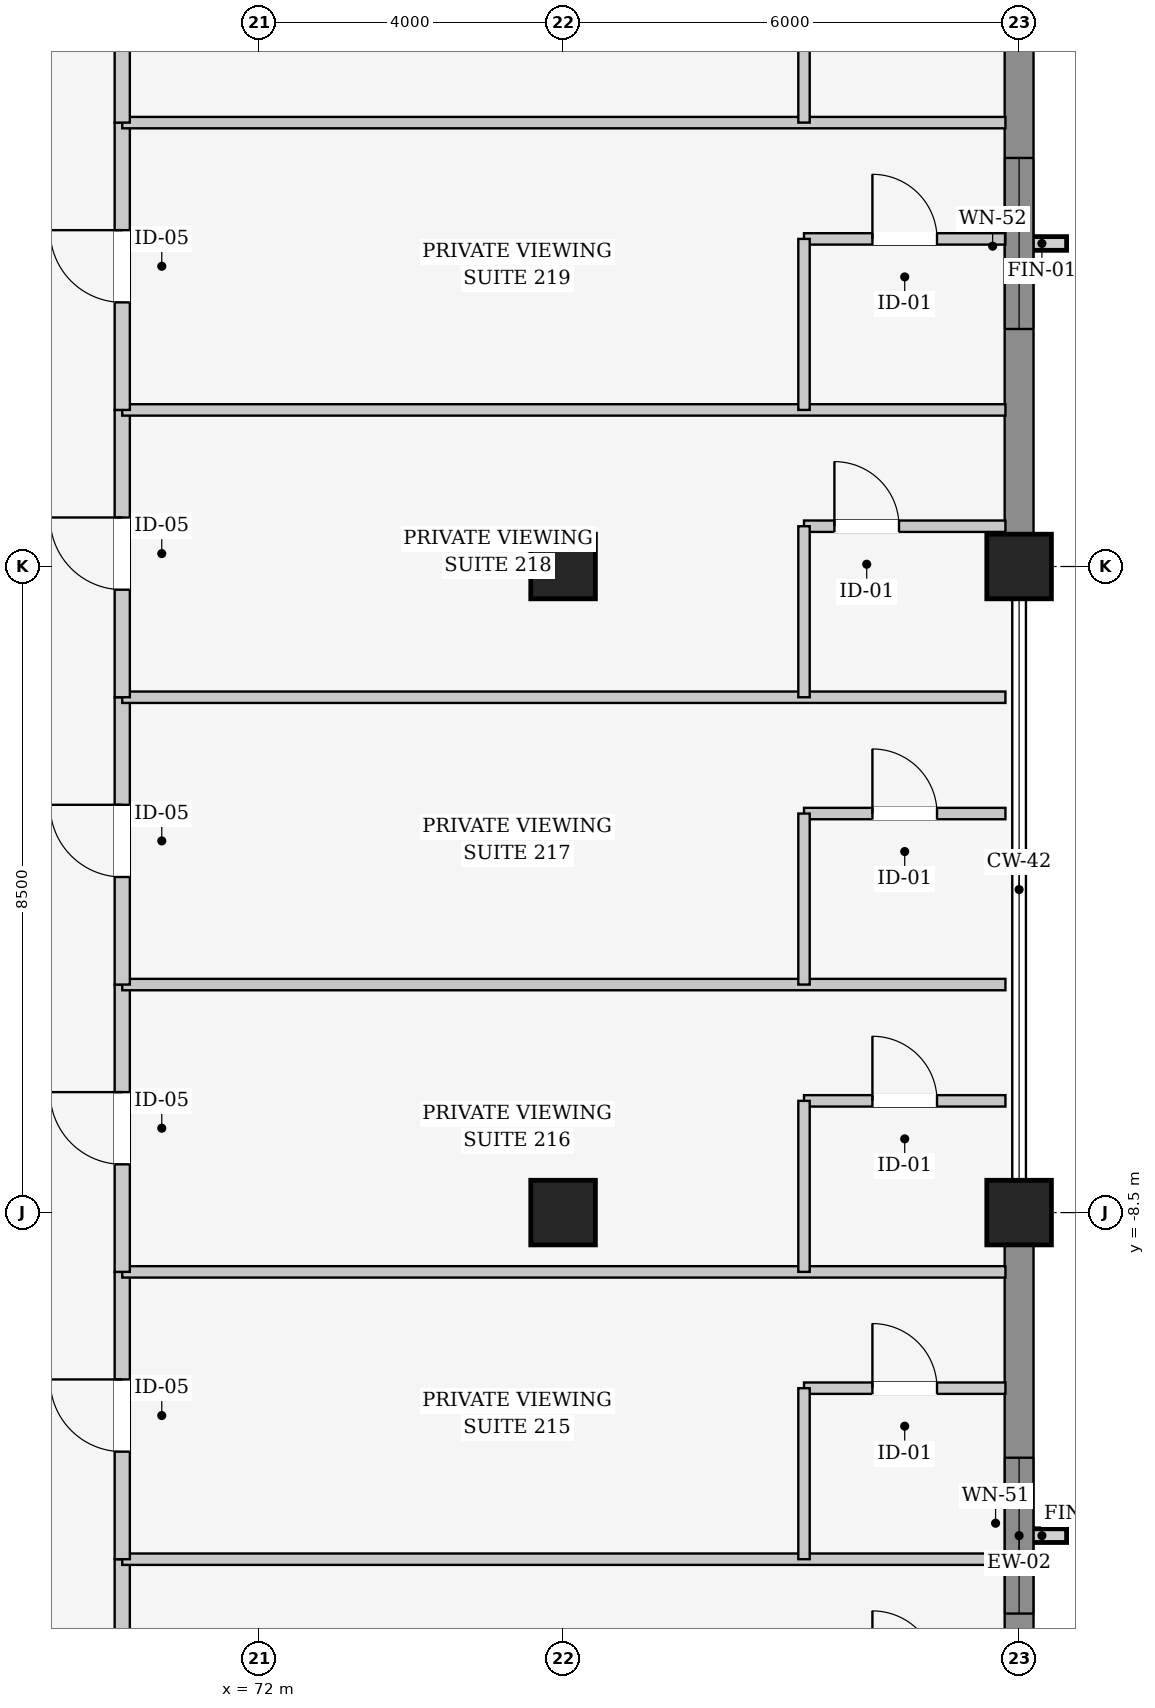
"""IFC4 building model, lengths in metres.
Left out: names, types, materials, properties, quantities, classifications, styles, units other than length and angle.
Written with IfcOpenShell. Run it as: python <this file> out.ifc"""

import sys

from ifc_helpers import new_model, si_unit, direction, frame, frame_2d, origin, origin_2d, place, context, subcontext, project, spatial, rectangle, extrude, element, fill, save


model = new_model("IFC4")
c1 = context("Model", 3, precision=1e-05, world=origin(), true_north=direction((0.0, 1.0)))
c2 = subcontext(c1, "Body", "Model", "MODEL_VIEW")
j1 = project(units=[si_unit("LENGTHUNIT", "METRE"), si_unit("PLANEANGLEUNIT", "RADIAN")], contexts=[c1])
p1 = place(None, origin())
s1 = spatial("IfcSite", under=j1, at=p1, CompositionType="ELEMENT")
p2 = place(p1, origin())
s2 = spatial("IfcBuilding", under=s1, at=p2, CompositionType="ELEMENT")
p3 = place(p2, frame((0.0, 0.0, 11.4)))
s3 = spatial("IfcBuildingStorey", under=s2, at=p3, CompositionType="ELEMENT", Elevation=11.4)
for number, where, z_axis, x_axis in (
    (1, (76.0, -8.5, 0.0), (0.0, 0.0, 1.0), (1.0, 0.0, 0.0)),
    (2, (76.0, 0.0, 0.0), (0.0, 0.0, 1.0), (1.0, 0.0, 0.0)),
    (3, (82.0, -8.5, 0.0), (0.0, 0.0, 1.0), (1.0, 0.0, 0.0)),
    (4, (82.0, 0.0, 0.0), (0.0, 0.0, 1.0), (1.0, 0.0, 0.0)),
):
    element("IfcColumn", number, at=place(p3, frame(where, z_axis=z_axis, x_axis=x_axis)), inside=s3, PredefinedType="COLUMN", context=c2, shape_type="SweptSolid", body=[
        extrude(rectangle(XDim=0.85, YDim=0.85, at=origin_2d()), origin(), (0.0, 0.0, 1.0), 4.8),
    ])
p4 = place(p3, frame((82.0, -8.907, 0.0), z_axis=(0.0, 0.0, 1.0), x_axis=(0.0, -1.0, 0.0)))
e5 = element("IfcWall", 5, at=p4, inside=s3, PredefinedType="SOLIDWALL", context=c2, shape_type="SweptSolid", body=[
    extrude(rectangle(XDim=7.686, YDim=0.38, at=frame_2d((3.843, 0.0))), origin(), (0.0, 0.0, 1.0), 3.76),
])
p5 = place(p4, frame((2.818, 0.0, 0.9)))
e6 = element("IfcOpeningElement", 6, at=p5, cuts=e5, PredefinedType="OPENING", context=c2, shape_type="SweptSolid", body=[
    extrude(rectangle(XDim=2.05, YDim=2.5, at=frame_2d((1.025, 1.25))), frame((0.0, 0.2, 0.0), z_axis=(0.0, -1.0, 0.0), x_axis=(1.0, 0.0, 0.0)), (0.0, 0.0, 1.0), 0.4),
])
p6 = place(p3, frame((82.0, 8.093, 0.0), z_axis=(0.0, 0.0, 1.0), x_axis=(0.0, -1.0, 0.0)))
e7 = element("IfcWall", 7, at=p6, inside=s3, PredefinedType="SOLIDWALL", context=c2, shape_type="SweptSolid", body=[
    extrude(rectangle(XDim=7.686, YDim=0.38, at=frame_2d((3.843, 0.0))), origin(), (0.0, 0.0, 1.0), 3.76),
])
p7 = place(p6, frame((2.718, 0.0, 0.9)))
e8 = element("IfcOpeningElement", 8, at=p7, cuts=e7, PredefinedType="OPENING", context=c2, shape_type="SweptSolid", body=[
    extrude(rectangle(XDim=2.25, YDim=2.5, at=frame_2d((1.125, 1.25))), frame((0.0, 0.2, 0.0), z_axis=(0.0, -1.0, 0.0), x_axis=(1.0, 0.0, 0.0)), (0.0, 0.0, 1.0), 0.4),
])
p8 = place(p3, frame((70.2, -16.84, 0.0), z_axis=(0.0, 0.0, 1.0), x_axis=(0.0, 1.0, 0.0)))
e9 = element("IfcWall", 9, at=p8, inside=s3, PredefinedType="PARTITIONING", context=c2, shape_type="SweptSolid", body=[
    extrude(rectangle(XDim=3.78, YDim=0.2, at=frame_2d((1.89, 0.0))), origin(), (0.0, 0.0, 1.0), 3.545),
])
p9 = place(p8, frame((1.415, 0.0, 0.0)))
e10 = element("IfcOpeningElement", 10, at=p9, cuts=e9, PredefinedType="OPENING", context=c2, shape_type="SweptSolid", body=[
    extrude(rectangle(XDim=0.95, YDim=2.25, at=frame_2d((0.475, 1.125))), frame((0.0, 0.11, 0.0), z_axis=(0.0, -1.0, 0.0), x_axis=(1.0, 0.0, 0.0)), (0.0, 0.0, 1.0), 0.22),
])
p10 = place(p3, frame((70.2, -13.06, 0.0), z_axis=(0.0, 0.0, 1.0), x_axis=(1.0, 0.0, 0.0)))
e11 = element("IfcWall", 11, at=p10, inside=s3, PredefinedType="PARTITIONING", context=c2, shape_type="SweptSolid", body=[
    extrude(rectangle(XDim=11.62, YDim=0.15, at=frame_2d((5.81, 0.0))), origin(), (0.0, 0.0, 1.0), 3.845),
])
p11 = place(p3, frame((79.17, -10.81, 0.0), z_axis=(0.0, 0.0, 1.0), x_axis=(1.0, 0.0, 0.0)))
e12 = element("IfcWall", 12, at=p11, inside=s3, PredefinedType="PARTITIONING", context=c2, shape_type="SweptSolid", body=[
    extrude(rectangle(XDim=2.65, YDim=0.15, at=frame_2d((1.325, 0.0))), origin(), (0.0, 0.0, 1.0), 3.845),
])
p12 = place(p11, frame((0.9, 0.0, 0.0)))
e13 = element("IfcOpeningElement", 13, at=p12, cuts=e12, PredefinedType="OPENING", context=c2, shape_type="SweptSolid", body=[
    extrude(rectangle(XDim=0.85, YDim=2.15, at=frame_2d((0.425, 1.075))), frame((0.0, 0.085, 0.0), z_axis=(0.0, -1.0, 0.0), x_axis=(1.0, 0.0, 0.0)), (0.0, 0.0, 1.0), 0.17),
])
p13 = place(p3, frame((79.17, -13.06, 0.0), z_axis=(0.0, 0.0, 1.0), x_axis=(0.0, 1.0, 0.0)))
e14 = element("IfcWall", 14, at=p13, inside=s3, PredefinedType="PARTITIONING", context=c2, shape_type="SweptSolid", body=[
    extrude(rectangle(XDim=2.25, YDim=0.15, at=frame_2d((1.125, 0.0))), origin(), (0.0, 0.0, 1.0), 4.14),
])
p14 = place(p3, frame((70.2, -13.06, 0.0), z_axis=(0.0, 0.0, 1.0), x_axis=(0.0, 1.0, 0.0)))
e15 = element("IfcWall", 15, at=p14, inside=s3, PredefinedType="PARTITIONING", context=c2, shape_type="SweptSolid", body=[
    extrude(rectangle(XDim=3.78, YDim=0.2, at=frame_2d((1.89, 0.0))), origin(), (0.0, 0.0, 1.0), 4.14),
])
p15 = place(p14, frame((1.415, 0.0, 0.0)))
e16 = element("IfcOpeningElement", 16, at=p15, cuts=e15, PredefinedType="OPENING", context=c2, shape_type="SweptSolid", body=[
    extrude(rectangle(XDim=0.95, YDim=2.25, at=frame_2d((0.475, 1.125))), frame((0.0, 0.11, 0.0), z_axis=(0.0, -1.0, 0.0), x_axis=(1.0, 0.0, 0.0)), (0.0, 0.0, 1.0), 0.22),
])
p16 = place(p3, frame((70.2, -9.28, 0.0), z_axis=(0.0, 0.0, 1.0), x_axis=(1.0, 0.0, 0.0)))
e17 = element("IfcWall", 17, at=p16, inside=s3, PredefinedType="PARTITIONING", context=c2, shape_type="SweptSolid", body=[
    extrude(rectangle(XDim=11.62, YDim=0.15, at=frame_2d((5.81, 0.0))), origin(), (0.0, 0.0, 1.0), 3.845),
])
p17 = place(p3, frame((79.17, -7.03, 0.0), z_axis=(0.0, 0.0, 1.0), x_axis=(1.0, 0.0, 0.0)))
e18 = element("IfcWall", 18, at=p17, inside=s3, PredefinedType="PARTITIONING", context=c2, shape_type="SweptSolid", body=[
    extrude(rectangle(XDim=2.65, YDim=0.15, at=frame_2d((1.325, 0.0))), origin(), (0.0, 0.0, 1.0), 3.845),
])
p18 = place(p17, frame((0.9, 0.0, 0.0)))
e19 = element("IfcOpeningElement", 19, at=p18, cuts=e18, PredefinedType="OPENING", context=c2, shape_type="SweptSolid", body=[
    extrude(rectangle(XDim=0.85, YDim=2.15, at=frame_2d((0.425, 1.075))), frame((0.0, 0.085, 0.0), z_axis=(0.0, -1.0, 0.0), x_axis=(1.0, 0.0, 0.0)), (0.0, 0.0, 1.0), 0.17),
])
p19 = place(p3, frame((79.17, -9.28, 0.0), z_axis=(0.0, 0.0, 1.0), x_axis=(0.0, 1.0, 0.0)))
e20 = element("IfcWall", 20, at=p19, inside=s3, PredefinedType="PARTITIONING", context=c2, shape_type="SweptSolid", body=[
    extrude(rectangle(XDim=2.25, YDim=0.15, at=frame_2d((1.125, 0.0))), origin(), (0.0, 0.0, 1.0), 3.745),
])
p20 = place(p3, frame((70.2, -9.28, 0.0), z_axis=(0.0, 0.0, 1.0), x_axis=(0.0, 1.0, 0.0)))
e21 = element("IfcWall", 21, at=p20, inside=s3, PredefinedType="PARTITIONING", context=c2, shape_type="SweptSolid", body=[
    extrude(rectangle(XDim=3.78, YDim=0.2, at=frame_2d((1.89, 0.0))), origin(), (0.0, 0.0, 1.0), 3.545),
])
p21 = place(p20, frame((1.415, 0.0, 0.0)))
e22 = element("IfcOpeningElement", 22, at=p21, cuts=e21, PredefinedType="OPENING", context=c2, shape_type="SweptSolid", body=[
    extrude(rectangle(XDim=0.95, YDim=2.25, at=frame_2d((0.475, 1.125))), frame((0.0, 0.11, 0.0), z_axis=(0.0, -1.0, 0.0), x_axis=(1.0, 0.0, 0.0)), (0.0, 0.0, 1.0), 0.22),
])
p22 = place(p3, frame((70.2, -5.5, 0.0), z_axis=(0.0, 0.0, 1.0), x_axis=(1.0, 0.0, 0.0)))
e23 = element("IfcWall", 23, at=p22, inside=s3, PredefinedType="PARTITIONING", context=c2, shape_type="SweptSolid", body=[
    extrude(rectangle(XDim=11.62, YDim=0.15, at=frame_2d((5.81, 0.0))), origin(), (0.0, 0.0, 1.0), 3.845),
])
p23 = place(p3, frame((79.17, -3.25, 0.0), z_axis=(0.0, 0.0, 1.0), x_axis=(1.0, 0.0, 0.0)))
e24 = element("IfcWall", 24, at=p23, inside=s3, PredefinedType="PARTITIONING", context=c2, shape_type="SweptSolid", body=[
    extrude(rectangle(XDim=2.65, YDim=0.15, at=frame_2d((1.325, 0.0))), origin(), (0.0, 0.0, 1.0), 3.845),
])
p24 = place(p23, frame((0.9, 0.0, 0.0)))
e25 = element("IfcOpeningElement", 25, at=p24, cuts=e24, PredefinedType="OPENING", context=c2, shape_type="SweptSolid", body=[
    extrude(rectangle(XDim=0.85, YDim=2.15, at=frame_2d((0.425, 1.075))), frame((0.0, 0.085, 0.0), z_axis=(0.0, -1.0, 0.0), x_axis=(1.0, 0.0, 0.0)), (0.0, 0.0, 1.0), 0.17),
])
p25 = place(p3, frame((79.17, -5.5, 0.0), z_axis=(0.0, 0.0, 1.0), x_axis=(0.0, 1.0, 0.0)))
e26 = element("IfcWall", 26, at=p25, inside=s3, PredefinedType="PARTITIONING", context=c2, shape_type="SweptSolid", body=[
    extrude(rectangle(XDim=2.25, YDim=0.15, at=frame_2d((1.125, 0.0))), origin(), (0.0, 0.0, 1.0), 4.14),
])
p26 = place(p3, frame((70.2, -5.5, 0.0), z_axis=(0.0, 0.0, 1.0), x_axis=(0.0, 1.0, 0.0)))
e27 = element("IfcWall", 27, at=p26, inside=s3, PredefinedType="PARTITIONING", context=c2, shape_type="SweptSolid", body=[
    extrude(rectangle(XDim=3.78, YDim=0.2, at=frame_2d((1.89, 0.0))), origin(), (0.0, 0.0, 1.0), 4.14),
])
p27 = place(p26, frame((1.415, 0.0, 0.0)))
e28 = element("IfcOpeningElement", 28, at=p27, cuts=e27, PredefinedType="OPENING", context=c2, shape_type="SweptSolid", body=[
    extrude(rectangle(XDim=0.95, YDim=2.25, at=frame_2d((0.475, 1.125))), frame((0.0, 0.11, 0.0), z_axis=(0.0, -1.0, 0.0), x_axis=(1.0, 0.0, 0.0)), (0.0, 0.0, 1.0), 0.22),
])
p28 = place(p3, frame((70.2, -1.72, 0.0), z_axis=(0.0, 0.0, 1.0), x_axis=(1.0, 0.0, 0.0)))
e29 = element("IfcWall", 29, at=p28, inside=s3, PredefinedType="PARTITIONING", context=c2, shape_type="SweptSolid", body=[
    extrude(rectangle(XDim=11.62, YDim=0.15, at=frame_2d((5.81, 0.0))), origin(), (0.0, 0.0, 1.0), 3.845),
])
p29 = place(p3, frame((79.17, 0.53, 0.0), z_axis=(0.0, 0.0, 1.0), x_axis=(1.0, 0.0, 0.0)))
e30 = element("IfcWall", 30, at=p29, inside=s3, PredefinedType="PARTITIONING", context=c2, shape_type="SweptSolid", body=[
    extrude(rectangle(XDim=2.65, YDim=0.15, at=frame_2d((1.325, 0.0))), origin(), (0.0, 0.0, 1.0), 3.845),
])
p30 = place(p29, frame((0.4, 0.0, 0.0)))
e31 = element("IfcOpeningElement", 31, at=p30, cuts=e30, PredefinedType="OPENING", context=c2, shape_type="SweptSolid", body=[
    extrude(rectangle(XDim=0.85, YDim=2.15, at=frame_2d((0.425, 1.075))), frame((0.0, 0.085, 0.0), z_axis=(0.0, -1.0, 0.0), x_axis=(1.0, 0.0, 0.0)), (0.0, 0.0, 1.0), 0.17),
])
p31 = place(p3, frame((79.17, -1.72, 0.0), z_axis=(0.0, 0.0, 1.0), x_axis=(0.0, 1.0, 0.0)))
e32 = element("IfcWall", 32, at=p31, inside=s3, PredefinedType="PARTITIONING", context=c2, shape_type="SweptSolid", body=[
    extrude(rectangle(XDim=2.25, YDim=0.15, at=frame_2d((1.125, 0.0))), origin(), (0.0, 0.0, 1.0), 3.745),
])
p32 = place(p3, frame((70.2, -1.72, 0.0), z_axis=(0.0, 0.0, 1.0), x_axis=(0.0, 1.0, 0.0)))
e33 = element("IfcWall", 33, at=p32, inside=s3, PredefinedType="PARTITIONING", context=c2, shape_type="SweptSolid", body=[
    extrude(rectangle(XDim=3.78, YDim=0.2, at=frame_2d((1.89, 0.0))), origin(), (0.0, 0.0, 1.0), 3.545),
])
p33 = place(p32, frame((1.415, 0.0, 0.0)))
e34 = element("IfcOpeningElement", 34, at=p33, cuts=e33, PredefinedType="OPENING", context=c2, shape_type="SweptSolid", body=[
    extrude(rectangle(XDim=0.95, YDim=2.25, at=frame_2d((0.475, 1.125))), frame((0.0, 0.11, 0.0), z_axis=(0.0, -1.0, 0.0), x_axis=(1.0, 0.0, 0.0)), (0.0, 0.0, 1.0), 0.22),
])
p34 = place(p3, frame((70.2, 2.06, 0.0), z_axis=(0.0, 0.0, 1.0), x_axis=(1.0, 0.0, 0.0)))
e35 = element("IfcWall", 35, at=p34, inside=s3, PredefinedType="PARTITIONING", context=c2, shape_type="SweptSolid", body=[
    extrude(rectangle(XDim=11.62, YDim=0.15, at=frame_2d((5.81, 0.0))), origin(), (0.0, 0.0, 1.0), 3.845),
])
p35 = place(p3, frame((79.17, 4.31, 0.0), z_axis=(0.0, 0.0, 1.0), x_axis=(1.0, 0.0, 0.0)))
e36 = element("IfcWall", 36, at=p35, inside=s3, PredefinedType="PARTITIONING", context=c2, shape_type="SweptSolid", body=[
    extrude(rectangle(XDim=2.65, YDim=0.15, at=frame_2d((1.325, 0.0))), origin(), (0.0, 0.0, 1.0), 3.845),
])
p36 = place(p35, frame((0.9, 0.0, 0.0)))
e37 = element("IfcOpeningElement", 37, at=p36, cuts=e36, PredefinedType="OPENING", context=c2, shape_type="SweptSolid", body=[
    extrude(rectangle(XDim=0.85, YDim=2.15, at=frame_2d((0.425, 1.075))), frame((0.0, 0.085, 0.0), z_axis=(0.0, -1.0, 0.0), x_axis=(1.0, 0.0, 0.0)), (0.0, 0.0, 1.0), 0.17),
])
p37 = place(p3, frame((79.17, 2.06, 0.0), z_axis=(0.0, 0.0, 1.0), x_axis=(0.0, 1.0, 0.0)))
e38 = element("IfcWall", 38, at=p37, inside=s3, PredefinedType="PARTITIONING", context=c2, shape_type="SweptSolid", body=[
    extrude(rectangle(XDim=2.25, YDim=0.15, at=frame_2d((1.125, 0.0))), origin(), (0.0, 0.0, 1.0), 4.14),
])
p38 = place(p3, frame((70.2, 2.06, 0.0), z_axis=(0.0, 0.0, 1.0), x_axis=(0.0, 1.0, 0.0)))
e39 = element("IfcWall", 39, at=p38, inside=s3, PredefinedType="PARTITIONING", context=c2, shape_type="SweptSolid", body=[
    extrude(rectangle(XDim=3.78, YDim=0.2, at=frame_2d((1.89, 0.0))), origin(), (0.0, 0.0, 1.0), 4.14),
])
p39 = place(p38, frame((1.415, 0.0, 0.0)))
e40 = element("IfcOpeningElement", 40, at=p39, cuts=e39, PredefinedType="OPENING", context=c2, shape_type="SweptSolid", body=[
    extrude(rectangle(XDim=0.95, YDim=2.25, at=frame_2d((0.475, 1.125))), frame((0.0, 0.11, 0.0), z_axis=(0.0, -1.0, 0.0), x_axis=(1.0, 0.0, 0.0)), (0.0, 0.0, 1.0), 0.22),
])
p40 = place(p3, frame((70.2, 5.84, 0.0), z_axis=(0.0, 0.0, 1.0), x_axis=(1.0, 0.0, 0.0)))
e41 = element("IfcWall", 41, at=p40, inside=s3, PredefinedType="PARTITIONING", context=c2, shape_type="SweptSolid", body=[
    extrude(rectangle(XDim=11.62, YDim=0.15, at=frame_2d((5.81, 0.0))), origin(), (0.0, 0.0, 1.0), 3.845),
])
p41 = place(p3, frame((79.17, 5.84, 0.0), z_axis=(0.0, 0.0, 1.0), x_axis=(0.0, 1.0, 0.0)))
e42 = element("IfcWall", 42, at=p41, inside=s3, PredefinedType="PARTITIONING", context=c2, shape_type="SweptSolid", body=[
    extrude(rectangle(XDim=2.25, YDim=0.15, at=frame_2d((1.125, 0.0))), origin(), (0.0, 0.0, 1.0), 3.745),
])
p42 = place(p3, frame((70.2, 5.84, 0.0), z_axis=(0.0, 0.0, 1.0), x_axis=(0.0, 1.0, 0.0)))
e43 = element("IfcWall", 43, at=p42, inside=s3, PredefinedType="PARTITIONING", context=c2, shape_type="SweptSolid", body=[
    extrude(rectangle(XDim=3.78, YDim=0.2, at=frame_2d((1.89, 0.0))), origin(), (0.0, 0.0, 1.0), 3.545),
])
p43 = place(p42, frame((1.415, 0.0, 0.0)))
e44 = element("IfcOpeningElement", 44, at=p43, cuts=e43, PredefinedType="OPENING", context=c2, shape_type="SweptSolid", body=[
    extrude(rectangle(XDim=0.95, YDim=2.25, at=frame_2d((0.475, 1.125))), frame((0.0, 0.11, 0.0), z_axis=(0.0, -1.0, 0.0), x_axis=(1.0, 0.0, 0.0)), (0.0, 0.0, 1.0), 0.22),
])
p44 = place(p5, origin())
e45 = element("IfcWindow", 45, at=p44, inside=s3, PartitioningType="SINGLE_PANEL", PredefinedType="WINDOW", context=c2, shape_type="SweptSolid", body=[
    extrude(rectangle(XDim=2.05, YDim=2.5, at=frame_2d((1.025, 1.25))), frame((0.0, 0.03, 0.0), z_axis=(0.0, -1.0, 0.0), x_axis=(1.0, 0.0, 0.0)), (0.0, 0.0, 1.0), 0.06),
])
fill(e6, e45)
p45 = place(p7, origin())
e46 = element("IfcWindow", 46, at=p45, inside=s3, PartitioningType="SINGLE_PANEL", PredefinedType="WINDOW", context=c2, shape_type="SweptSolid", body=[
    extrude(rectangle(XDim=2.25, YDim=2.5, at=frame_2d((1.125, 1.25))), frame((0.0, 0.03, 0.0), z_axis=(0.0, -1.0, 0.0), x_axis=(1.0, 0.0, 0.0)), (0.0, 0.0, 1.0), 0.06),
])
fill(e8, e46)
p46 = place(p12, origin())
e47 = element("IfcDoor", 47, at=p46, inside=s3, OperationType="SINGLE_SWING_LEFT", PredefinedType="DOOR", context=c2, shape_type="SweptSolid", body=[
    extrude(rectangle(XDim=0.85, YDim=2.15, at=frame_2d((0.425, 1.075))), frame((0.0, 0.025, 0.0), z_axis=(0.0, -1.0, 0.0), x_axis=(1.0, 0.0, 0.0)), (0.0, 0.0, 1.0), 0.05),
])
fill(e13, e47)
p47 = place(p15, origin())
e48 = element("IfcDoor", 48, at=p47, inside=s3, OperationType="SINGLE_SWING_RIGHT", PredefinedType="DOOR", context=c2, shape_type="SweptSolid", body=[
    extrude(rectangle(XDim=0.95, YDim=2.25, at=frame_2d((0.475, 1.125))), frame((0.0, 0.025, 0.0), z_axis=(0.0, -1.0, 0.0), x_axis=(1.0, 0.0, 0.0)), (0.0, 0.0, 1.0), 0.05),
])
fill(e16, e48)
p48 = place(p18, origin())
e49 = element("IfcDoor", 49, at=p48, inside=s3, OperationType="SINGLE_SWING_LEFT", PredefinedType="DOOR", context=c2, shape_type="SweptSolid", body=[
    extrude(rectangle(XDim=0.85, YDim=2.15, at=frame_2d((0.425, 1.075))), frame((0.0, 0.025, 0.0), z_axis=(0.0, -1.0, 0.0), x_axis=(1.0, 0.0, 0.0)), (0.0, 0.0, 1.0), 0.05),
])
fill(e19, e49)
p49 = place(p21, origin())
e50 = element("IfcDoor", 50, at=p49, inside=s3, OperationType="SINGLE_SWING_RIGHT", PredefinedType="DOOR", context=c2, shape_type="SweptSolid", body=[
    extrude(rectangle(XDim=0.95, YDim=2.25, at=frame_2d((0.475, 1.125))), frame((0.0, 0.025, 0.0), z_axis=(0.0, -1.0, 0.0), x_axis=(1.0, 0.0, 0.0)), (0.0, 0.0, 1.0), 0.05),
])
fill(e22, e50)
p50 = place(p24, origin())
e51 = element("IfcDoor", 51, at=p50, inside=s3, OperationType="SINGLE_SWING_LEFT", PredefinedType="DOOR", context=c2, shape_type="SweptSolid", body=[
    extrude(rectangle(XDim=0.85, YDim=2.15, at=frame_2d((0.425, 1.075))), frame((0.0, 0.025, 0.0), z_axis=(0.0, -1.0, 0.0), x_axis=(1.0, 0.0, 0.0)), (0.0, 0.0, 1.0), 0.05),
])
fill(e25, e51)
p51 = place(p27, origin())
e52 = element("IfcDoor", 52, at=p51, inside=s3, OperationType="SINGLE_SWING_RIGHT", PredefinedType="DOOR", context=c2, shape_type="SweptSolid", body=[
    extrude(rectangle(XDim=0.95, YDim=2.25, at=frame_2d((0.475, 1.125))), frame((0.0, 0.025, 0.0), z_axis=(0.0, -1.0, 0.0), x_axis=(1.0, 0.0, 0.0)), (0.0, 0.0, 1.0), 0.05),
])
fill(e28, e52)
p52 = place(p30, origin())
e53 = element("IfcDoor", 53, at=p52, inside=s3, OperationType="SINGLE_SWING_LEFT", PredefinedType="DOOR", context=c2, shape_type="SweptSolid", body=[
    extrude(rectangle(XDim=0.85, YDim=2.15, at=frame_2d((0.425, 1.075))), frame((0.0, 0.025, 0.0), z_axis=(0.0, -1.0, 0.0), x_axis=(1.0, 0.0, 0.0)), (0.0, 0.0, 1.0), 0.05),
])
fill(e31, e53)
p53 = place(p33, origin())
e54 = element("IfcDoor", 54, at=p53, inside=s3, OperationType="SINGLE_SWING_RIGHT", PredefinedType="DOOR", context=c2, shape_type="SweptSolid", body=[
    extrude(rectangle(XDim=0.95, YDim=2.25, at=frame_2d((0.475, 1.125))), frame((0.0, 0.025, 0.0), z_axis=(0.0, -1.0, 0.0), x_axis=(1.0, 0.0, 0.0)), (0.0, 0.0, 1.0), 0.05),
])
fill(e34, e54)
p54 = place(p36, origin())
e55 = element("IfcDoor", 55, at=p54, inside=s3, OperationType="SINGLE_SWING_LEFT", PredefinedType="DOOR", context=c2, shape_type="SweptSolid", body=[
    extrude(rectangle(XDim=0.85, YDim=2.15, at=frame_2d((0.425, 1.075))), frame((0.0, 0.025, 0.0), z_axis=(0.0, -1.0, 0.0), x_axis=(1.0, 0.0, 0.0)), (0.0, 0.0, 1.0), 0.05),
])
fill(e37, e55)
p55 = place(p39, origin())
e56 = element("IfcDoor", 56, at=p55, inside=s3, OperationType="SINGLE_SWING_RIGHT", PredefinedType="DOOR", context=c2, shape_type="SweptSolid", body=[
    extrude(rectangle(XDim=0.95, YDim=2.25, at=frame_2d((0.475, 1.125))), frame((0.0, 0.025, 0.0), z_axis=(0.0, -1.0, 0.0), x_axis=(1.0, 0.0, 0.0)), (0.0, 0.0, 1.0), 0.05),
])
fill(e40, e56)
save(model, sys.argv[1])
